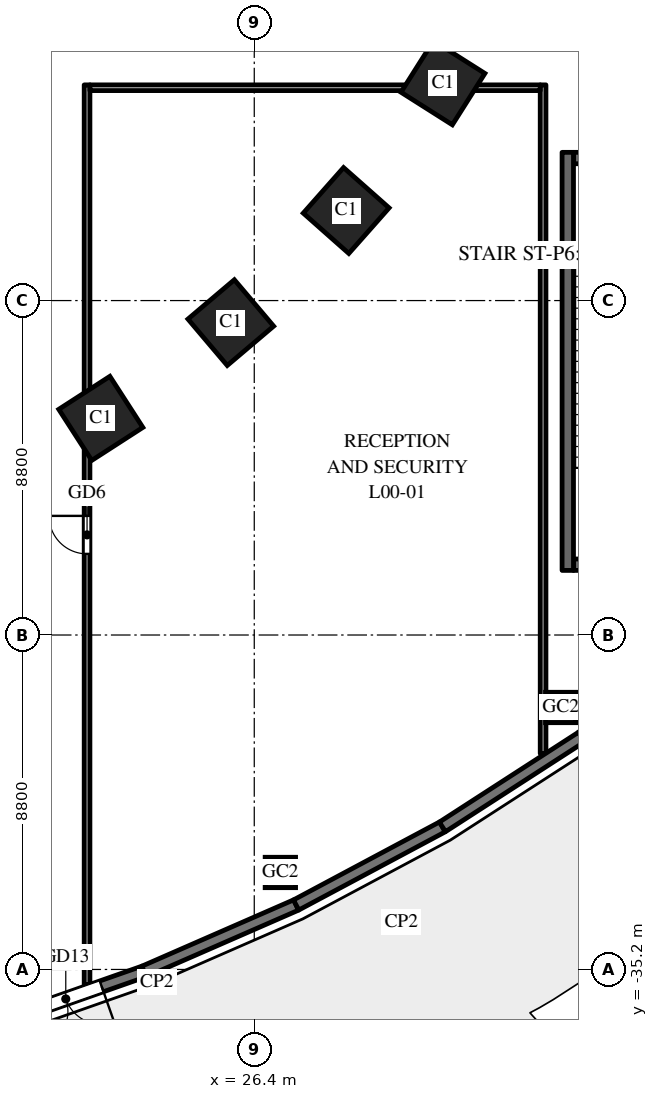
"""IFC4 building model, lengths in metres.
Left out: names, types, materials, properties, quantities, classifications, styles, units other than length and angle.
Written with IfcOpenShell. Run it as: python <this file> out.ifc"""

import sys

from ifc_helpers import new_model, si_unit, direction, frame, frame_2d, origin, origin_2d, place, context, subcontext, project, spatial, rectangle, hollow_rectangle, i_section, extrude, element, fill, save


model = new_model("IFC4")
c1 = context("Model", 3, precision=1e-05, world=origin(), true_north=direction((0.0, 1.0)))
c2 = subcontext(c1, "Body", "Model", "MODEL_VIEW")
j1 = project(units=[si_unit("LENGTHUNIT", "METRE"), si_unit("PLANEANGLEUNIT", "RADIAN")], contexts=[c1])
p1 = place(None, origin())
s1 = spatial("IfcSite", under=j1, at=p1, CompositionType="ELEMENT")
p2 = place(p1, origin())
s2 = spatial("IfcBuilding", under=s1, at=p2, CompositionType="ELEMENT")
p3 = place(p2, origin())
s3 = spatial("IfcBuildingStorey", under=s2, at=p3, CompositionType="ELEMENT", Elevation=0.0)
for number, where, z_axis, x_axis in (
    (1, (22.362, -20.7, 0.0), (0.0, 0.0, 1.0), (0.84, 0.542, 0.0)),
    (2, (25.783, -18.18, 0.0), (0.0, 0.0, 1.0), (0.763, 0.646, 0.0)),
    (3, (28.819, -15.23, 0.0), (0.0, 0.0, 1.0), (0.663, 0.749, 0.0)),
    (4, (31.365, -11.871, 0.0), (0.0, 0.0, 1.0), (0.535, 0.845, 0.0)),
):
    element("IfcColumn", number, at=place(p3, frame(where, z_axis=z_axis, x_axis=x_axis)), inside=s3, PredefinedType="COLUMN", context=c2, shape_type="SweptSolid", body=[
        extrude(rectangle(XDim=1.6, YDim=1.6, at=origin_2d()), origin(), (0.0, 0.0, 1.0), 7.5),
    ])
for number, where, z_axis, x_axis in (
    (5, (27.087, -32.648, 0.0), (0.0, 0.0, 1.0), (1.0, 0.0, 0.0)),
    (6, (34.465, -28.307, 0.0), (0.0, 0.0, 1.0), (1.0, 0.0, 0.0)),
):
    element("IfcColumn", number, at=place(p3, frame(where, z_axis=z_axis, x_axis=x_axis)), inside=s3, PredefinedType="COLUMN", context=c2, shape_type="SweptSolid", body=[
        extrude(hollow_rectangle(XDim=0.8, YDim=0.8, WallThickness=0.04, at=origin_2d()), origin(), (0.0, 0.0, 1.0), 7.5),
    ])
p4 = place(p3, frame((34.0, -11.925, 0.0), z_axis=(0.0, 0.0, 1.0), x_axis=(0.0, -1.0, 0.0)))
e7 = element("IfcWall", 7, at=p4, inside=s3, PredefinedType="PARTITIONING", context=c2, shape_type="SweptSolid", body=[
    extrude(rectangle(XDim=17.594, YDim=0.15, at=frame_2d((8.797, 0.0))), origin(), (0.0, 0.0, 1.0), 6.25),
])
p5 = place(p3, frame((22.0, -35.606, 0.0), z_axis=(0.0, 0.0, 1.0), x_axis=(0.0, 1.0, 0.0)))
e8 = element("IfcWall", 8, at=p5, inside=s3, PredefinedType="PARTITIONING", context=c2, shape_type="SweptSolid", body=[
    extrude(rectangle(XDim=23.681, YDim=0.15, at=frame_2d((11.84, 0.0))), origin(), (0.0, 0.0, 1.0), 6.25),
])
p6 = place(p5, frame((11.34, 0.0, 0.0)))
e9 = element("IfcOpeningElement", 9, at=p6, cuts=e8, PredefinedType="OPENING", context=c2, shape_type="SweptSolid", body=[
    extrude(rectangle(XDim=1.0, YDim=2.1, at=frame_2d((0.5, 1.05))), frame((0.0, 0.085, 0.0), z_axis=(0.0, -1.0, 0.0), x_axis=(1.0, 0.0, 0.0)), (0.0, 0.0, 1.0), 0.17),
])
p7 = place(p3, frame((22.075, -12.0, 0.0), z_axis=(0.0, 0.0, 1.0), x_axis=(1.0, 0.0, 0.0)))
e10 = element("IfcWall", 10, at=p7, inside=s3, PredefinedType="PARTITIONING", context=c2, shape_type="SweptSolid", body=[
    extrude(rectangle(XDim=11.85, YDim=0.15, at=frame_2d((5.925, 0.0))), origin(), (0.0, 0.0, 1.0), 6.2),
])
p8 = place(p3, frame((19.379, -36.699, 0.0), z_axis=(0.0, 0.0, 1.0), x_axis=(0.943526738033, 0.331296384853, 0.0)))
e11 = element("IfcWall", 11, at=p8, inside=s3, PredefinedType="SOLIDWALL", context=c2, shape_type="SweptSolid", body=[
    extrude(rectangle(XDim=4.368, YDim=0.3, at=frame_2d((2.184, 0.0))), origin(), (0.0, 0.0, 1.0), 7.25),
])
p9 = place(p8, frame((1.184, 0.0, 0.0)))
e12 = element("IfcOpeningElement", 12, at=p9, cuts=e11, PredefinedType="OPENING", context=c2, shape_type="SweptSolid", body=[
    extrude(rectangle(XDim=2.0, YDim=2.4, at=frame_2d((1.0, 1.2))), frame((0.0, 0.16, 0.0), z_axis=(0.0, -1.0, 0.0), x_axis=(1.0, 0.0, 0.0)), (0.0, 0.0, 1.0), 0.32),
])
p10 = place(p3, frame((23.5, -35.252, 0.0), z_axis=(0.0, 0.0, 1.0), x_axis=(0.916336904548, 0.400408138483, 0.0)))
e13 = element("IfcWall", 13, at=p10, inside=s3, PredefinedType="SOLIDWALL", context=c2, shape_type="SweptSolid", body=[
    extrude(rectangle(XDim=4.366, YDim=0.3, at=frame_2d((2.183, 0.0))), origin(), (0.0, 0.0, 1.0), 7.25),
])
p11 = place(p10, frame((0.683, 0.0, 0.0)))
e14 = element("IfcOpeningElement", 14, at=p11, cuts=e13, PredefinedType="OPENING", context=c2, shape_type="SweptSolid", body=[
    extrude(rectangle(XDim=3.0, YDim=3.6, at=frame_2d((1.5, 1.8))), frame((0.0, 0.16, 0.0), z_axis=(0.0, -1.0, 0.0), x_axis=(1.0, 0.0, 0.0)), (0.0, 0.0, 1.0), 0.32),
])
p12 = place(p3, frame((27.501, -33.504, 0.0), z_axis=(0.0, 0.0, 1.0), x_axis=(0.882159305704, 0.47095112205, 0.0)))
e15 = element("IfcWall", 15, at=p12, inside=s3, PredefinedType="SOLIDWALL", context=c2, shape_type="SweptSolid", body=[
    extrude(rectangle(XDim=4.365, YDim=0.3, at=frame_2d((2.182, 0.0))), origin(), (0.0, 0.0, 1.0), 7.25),
])
p13 = place(p12, frame((0.682, 0.0, 0.0)))
e16 = element("IfcOpeningElement", 16, at=p13, cuts=e15, PredefinedType="OPENING", context=c2, shape_type="SweptSolid", body=[
    extrude(rectangle(XDim=3.0, YDim=3.6, at=frame_2d((1.5, 1.8))), frame((0.0, 0.16, 0.0), z_axis=(0.0, -1.0, 0.0), x_axis=(1.0, 0.0, 0.0)), (0.0, 0.0, 1.0), 0.32),
])
p14 = place(p3, frame((31.352, -31.448, 0.0), z_axis=(0.0, 0.0, 1.0), x_axis=(0.840047348843, 0.542513088969, 0.0)))
e17 = element("IfcWall", 17, at=p14, inside=s3, PredefinedType="SOLIDWALL", context=c2, shape_type="SweptSolid", body=[
    extrude(rectangle(XDim=4.362, YDim=0.3, at=frame_2d((2.181, 0.0))), origin(), (0.0, 0.0, 1.0), 7.25),
])
p15 = place(p14, frame((0.681, 0.0, 0.0)))
e18 = element("IfcOpeningElement", 18, at=p15, cuts=e17, PredefinedType="OPENING", context=c2, shape_type="SweptSolid", body=[
    extrude(rectangle(XDim=3.0, YDim=3.6, at=frame_2d((1.5, 1.8))), frame((0.0, 0.16, 0.0), z_axis=(0.0, -1.0, 0.0), x_axis=(1.0, 0.0, 0.0)), (0.0, 0.0, 1.0), 0.32),
])
p16 = place(p3, frame((35.016, -29.082, 0.0), z_axis=(0.0, 0.0, 1.0), x_axis=(0.788491985196, 0.615045030288, 0.0)))
e19 = element("IfcWall", 19, at=p16, inside=s3, PredefinedType="SOLIDWALL", context=c2, shape_type="SweptSolid", body=[
    extrude(rectangle(XDim=4.359, YDim=0.3, at=frame_2d((2.18, 0.0))), origin(), (0.0, 0.0, 1.0), 7.25),
])
p17 = place(p16, frame((1.18, 0.0, 0.0)))
e20 = element("IfcOpeningElement", 20, at=p17, cuts=e19, PredefinedType="OPENING", context=c2, shape_type="SweptSolid", body=[
    extrude(rectangle(XDim=2.0, YDim=2.4, at=frame_2d((1.0, 1.2))), frame((0.0, 0.16, 0.0), z_axis=(0.0, -1.0, 0.0), x_axis=(1.0, 0.0, 0.0)), (0.0, 0.0, 1.0), 0.32),
])
p18 = place(p3, frame((34.65, -24.7, 0.0), z_axis=(0.0, 0.0, 1.0), x_axis=(0.0, 1.0, 0.0)))
e21 = element("IfcWall", 21, at=p18, inside=s3, PredefinedType="SHEAR", context=c2, shape_type="SweptSolid", body=[
    extrude(rectangle(XDim=11.0, YDim=0.3, at=frame_2d((5.5, 0.0))), origin(), (0.0, 0.0, 1.0), 7.25),
])
p19 = place(p3, frame((34.8, -24.55, 0.0), z_axis=(0.0, 0.0, 1.0), x_axis=(1.0, 0.0, 0.0)))
e22 = element("IfcWall", 22, at=p19, inside=s3, PredefinedType="SHEAR", context=c2, shape_type="SweptSolid", body=[
    extrude(rectangle(XDim=4.95, YDim=0.3, at=frame_2d((2.475, 0.0))), origin(), (0.0, 0.0, 1.0), 7.25),
])
p20 = place(p3, frame((34.8, -13.85, 0.0), z_axis=(0.0, 0.0, 1.0), x_axis=(1.0, 0.0, 0.0)))
e23 = element("IfcWall", 23, at=p20, inside=s3, PredefinedType="SHEAR", context=c2, shape_type="SweptSolid", body=[
    extrude(rectangle(XDim=4.95, YDim=0.3, at=frame_2d((2.475, 0.0))), origin(), (0.0, 0.0, 1.0), 7.25),
])
p21 = place(p20, frame((1.475, 0.0, 0.0)))
e24 = element("IfcOpeningElement", 24, at=p21, cuts=e23, PredefinedType="OPENING", context=c2, shape_type="SweptSolid", body=[
    extrude(rectangle(XDim=2.0, YDim=2.1, at=frame_2d((1.0, 1.05))), frame((0.0, 0.16, 0.0), z_axis=(0.0, -1.0, 0.0), x_axis=(1.0, 0.0, 0.0)), (0.0, 0.0, 1.0), 0.32),
])
for number, where, z_axis, x_axis in (
    (25, (23.835, -35.542, -0.15), (0.0, 0.0, 1.0), (1.0, 0.0, 0.0)),
    (26, (30.27, -33.953, -0.15), (0.0, 0.0, 1.0), (1.0, 0.0, 0.0)),
):
    element("IfcColumn", number, at=place(p3, frame(where, z_axis=z_axis, x_axis=x_axis)), inside=s3, PredefinedType="COLUMN", context=c2, shape_type="SweptSolid", body=[
        extrude(i_section(OverallWidth=0.3, OverallDepth=0.3, WebThickness=0.011, FlangeThickness=0.019, FilletRadius=0.027, at=origin_2d()), origin(), (0.0, 0.0, 1.0), 12.3),
    ])
p22 = place(p6, origin())
e27 = element("IfcDoor", 27, at=p22, inside=s3, OperationType="SINGLE_SWING_RIGHT", PredefinedType="DOOR", context=c2, shape_type="SweptSolid", body=[
    extrude(rectangle(XDim=1.0, YDim=2.1, at=frame_2d((0.5, 1.05))), frame((0.0, 0.025, 0.0), z_axis=(0.0, -1.0, 0.0), x_axis=(1.0, 0.0, 0.0)), (0.0, 0.0, 1.0), 0.05),
])
fill(e9, e27)
p23 = place(p9, frame((2.0, 0.0, 0.0), z_axis=(0.0, 0.0, 1.0), x_axis=(-1.0, 0.0, 0.0)))
e28 = element("IfcDoor", 28, at=p23, inside=s3, OperationType="DOUBLE_DOOR_SINGLE_SWING", PredefinedType="DOOR", context=c2, shape_type="SweptSolid", body=[
    extrude(rectangle(XDim=2.0, YDim=2.4, at=frame_2d((1.0, 1.2))), frame((0.0, 0.025, 0.0), z_axis=(0.0, -1.0, 0.0), x_axis=(1.0, 0.0, 0.0)), (0.0, 0.0, 1.0), 0.05),
])
fill(e12, e28)
p24 = place(p11, origin())
e29 = element("IfcWindow", 29, at=p24, inside=s3, PartitioningType="SINGLE_PANEL", PredefinedType="WINDOW", context=c2, shape_type="SweptSolid", body=[
    extrude(rectangle(XDim=3.0, YDim=3.6, at=frame_2d((1.5, 1.8))), frame((0.0, 0.03, 0.0), z_axis=(0.0, -1.0, 0.0), x_axis=(1.0, 0.0, 0.0)), (0.0, 0.0, 1.0), 0.06),
])
fill(e14, e29)
p25 = place(p13, origin())
e30 = element("IfcWindow", 30, at=p25, inside=s3, PartitioningType="SINGLE_PANEL", PredefinedType="WINDOW", context=c2, shape_type="SweptSolid", body=[
    extrude(rectangle(XDim=3.0, YDim=3.6, at=frame_2d((1.5, 1.8))), frame((0.0, 0.03, 0.0), z_axis=(0.0, -1.0, 0.0), x_axis=(1.0, 0.0, 0.0)), (0.0, 0.0, 1.0), 0.06),
])
fill(e16, e30)
p26 = place(p15, origin())
e31 = element("IfcWindow", 31, at=p26, inside=s3, PartitioningType="SINGLE_PANEL", PredefinedType="WINDOW", context=c2, shape_type="SweptSolid", body=[
    extrude(rectangle(XDim=3.0, YDim=3.6, at=frame_2d((1.5, 1.8))), frame((0.0, 0.03, 0.0), z_axis=(0.0, -1.0, 0.0), x_axis=(1.0, 0.0, 0.0)), (0.0, 0.0, 1.0), 0.06),
])
fill(e18, e31)
save(model, sys.argv[1])
